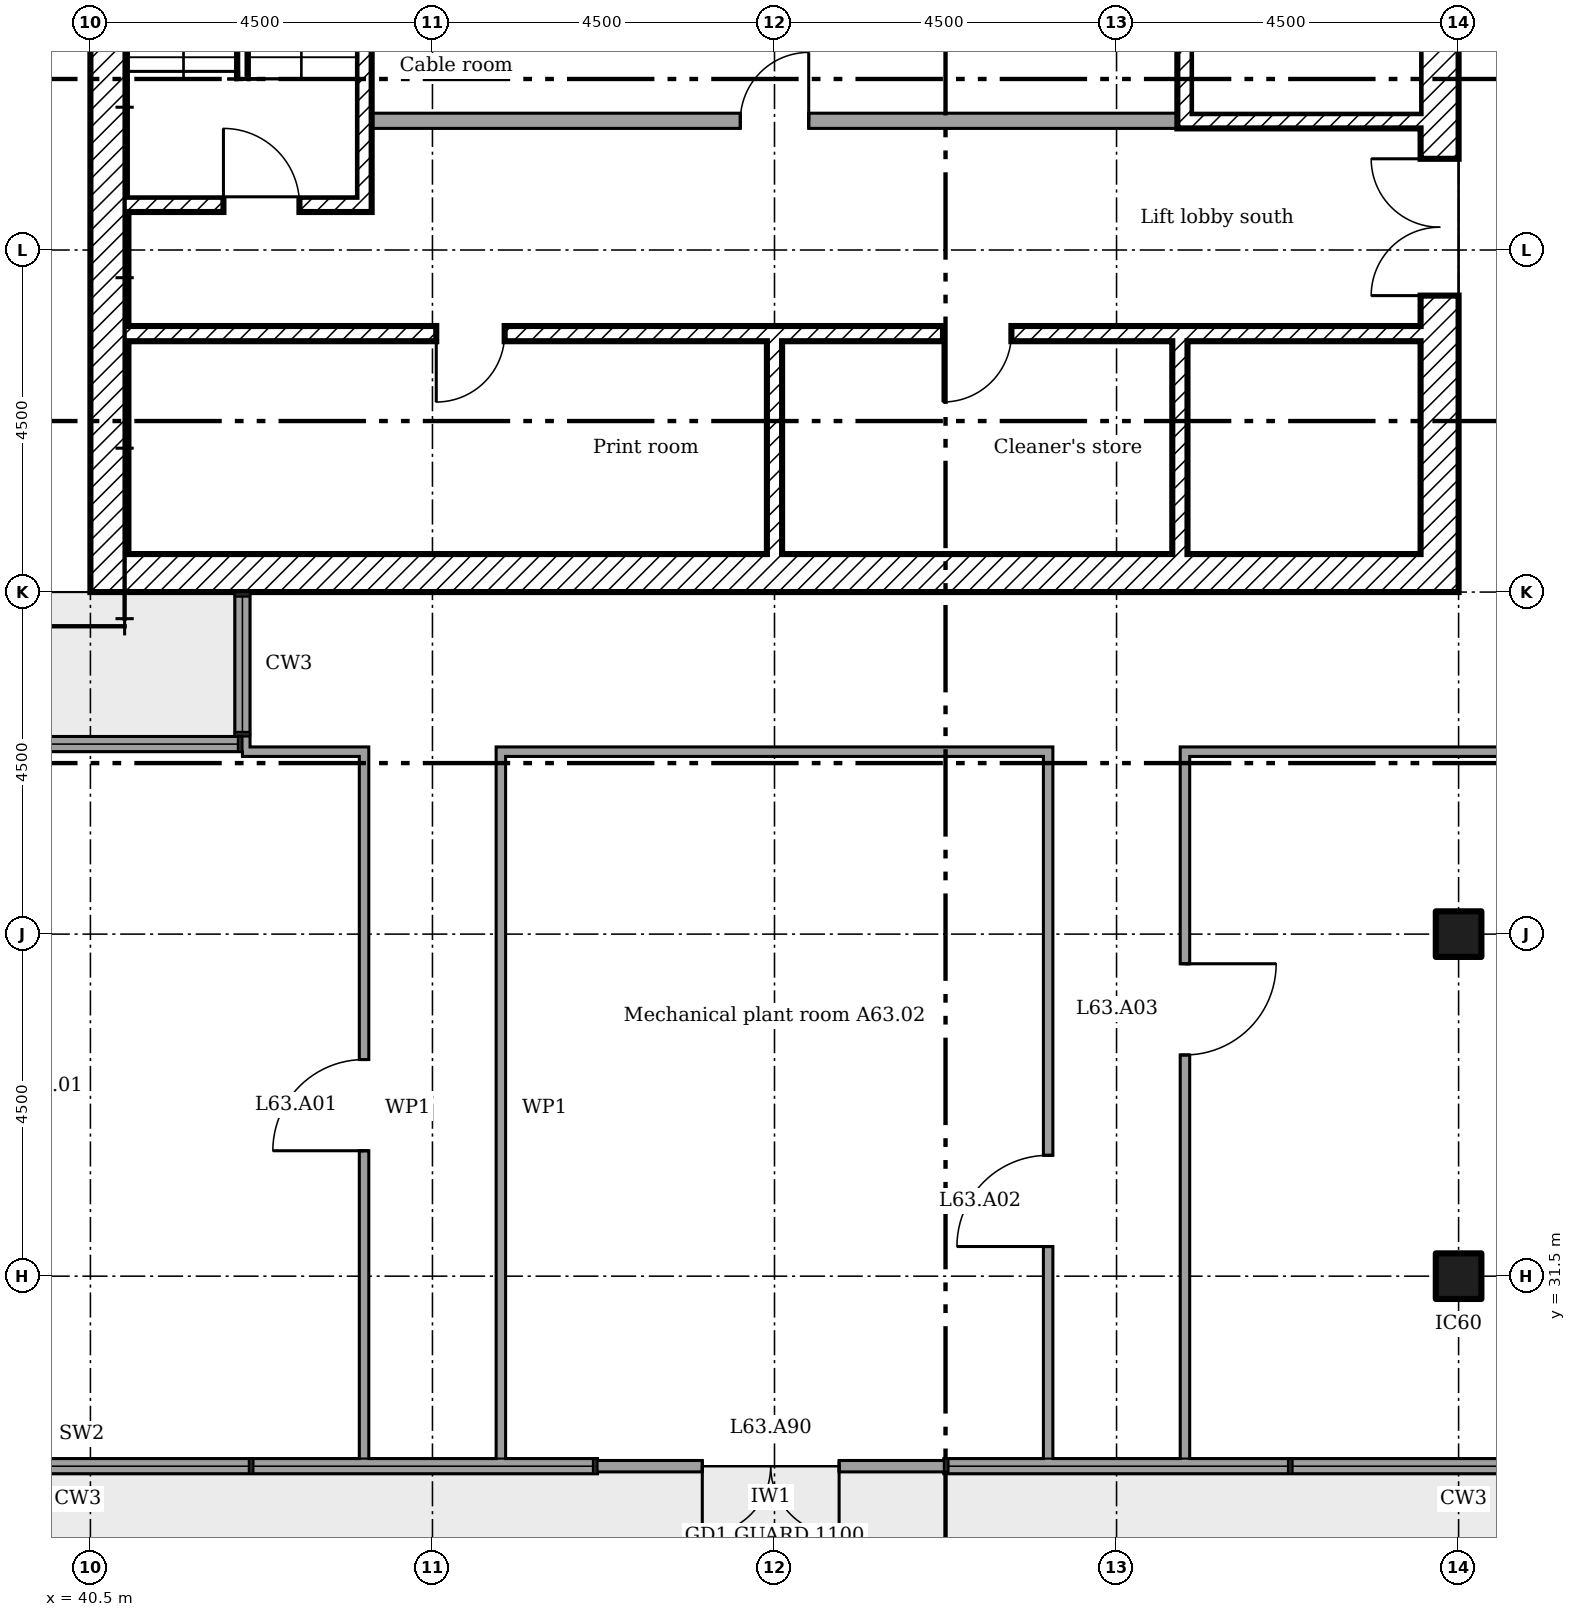
"""IFC4 building model, lengths in metres.
Left out: names, types, materials, properties, quantities, classifications, styles, units other than length and angle.
Written with IfcOpenShell. Run it as: python <this file> out.ifc"""

import sys

from ifc_helpers import new_model, si_unit, direction, frame, frame_2d, origin, origin_2d, place, context, subcontext, project, spatial, rectangle, extrude, element, fill, save


model = new_model("IFC4")
c1 = context("Model", 3, precision=1e-05, world=origin(), true_north=direction((0.0, 1.0)))
c2 = subcontext(c1, "Body", "Model", "MODEL_VIEW")
j1 = project(units=[si_unit("LENGTHUNIT", "METRE"), si_unit("PLANEANGLEUNIT", "RADIAN")], contexts=[c1])
p1 = place(None, origin())
s1 = spatial("IfcSite", under=j1, at=p1, CompositionType="ELEMENT")
p2 = place(p1, origin())
s2 = spatial("IfcBuilding", under=s1, at=p2, CompositionType="ELEMENT")
p3 = place(p2, frame((0.0, 0.0, 246.0)))
s3 = spatial("IfcBuildingStorey", under=s2, at=p3, CompositionType="ELEMENT", Elevation=246.0)
for number, where in (
    (1, (58.5, 31.5, 0.0)),
    (2, (58.5, 36.0, 0.0)),
):
    element("IfcColumn", number, at=place(p3, frame(where)), inside=s3, PredefinedType="COLUMN", context=c2, shape_type="SweptSolid", body=[
        extrude(rectangle(XDim=0.6, YDim=0.6, at=origin_2d()), origin(), (0.0, 0.0, 1.0), 5.0),
    ])
p4 = place(p3, frame((42.5, 40.5, 0.0), z_axis=(0.0, 0.0, 1.0), x_axis=(0.0, -1.0, 0.0)))
e3 = element("IfcWall", 3, at=p4, inside=s3, PredefinedType="ELEMENTEDWALL", context=c2, shape_type="SweptSolid", body=[
    extrude(rectangle(XDim=2.1, YDim=0.2, at=frame_2d((1.05, 0.0))), origin(), (0.0, 0.0, 1.0), 1.8),
])
p5 = place(p3, frame((42.4, 38.5, 0.0), z_axis=(0.0, 0.0, 1.0), x_axis=(-1.0, 0.0, 0.0)))
e4 = element("IfcWall", 4, at=p5, inside=s3, PredefinedType="ELEMENTEDWALL", context=c2, shape_type="SweptSolid", body=[
    extrude(rectangle(XDim=13.5, YDim=0.2, at=frame_2d((6.75, 0.0))), origin(), (0.0, 0.0, 1.0), 1.8),
])
p6 = place(p3, frame((33.6, 29.0, 0.0)))
e5 = element("IfcWall", 5, at=p6, inside=s3, PredefinedType="ELEMENTEDWALL", context=c2, shape_type="SweptSolid", body=[
    extrude(rectangle(XDim=13.571, YDim=0.2, at=frame_2d((6.786, 0.0))), origin(), (0.0, 0.0, 1.0), 1.8),
])
p7 = place(p3, frame((51.729, 29.0, 0.0)))
e6 = element("IfcWall", 6, at=p7, inside=s3, PredefinedType="ELEMENTEDWALL", context=c2, shape_type="SweptSolid", body=[
    extrude(rectangle(XDim=13.872, YDim=0.2, at=frame_2d((6.936, 0.0))), origin(), (0.0, 0.0, 1.0), 1.8),
])
p8 = place(p3, frame((47.171, 29.0, 0.0)))
e7 = element("IfcWall", 7, at=p8, inside=s3, PredefinedType="SOLIDWALL", context=c2, shape_type="SweptSolid", body=[
    extrude(rectangle(XDim=4.557, YDim=0.15, at=frame_2d((2.279, 0.0))), origin(), (0.0, 0.0, 1.0), 4.825),
])
p9 = place(p8, frame((1.379, 0.0, 0.0)))
e8 = element("IfcOpeningElement", 8, at=p9, cuts=e7, PredefinedType="OPENING", context=c2, shape_type="SweptSolid", body=[
    extrude(rectangle(XDim=1.8, YDim=2.4, at=frame_2d((0.9, 1.2))), frame((0.0, 0.085, 0.0), z_axis=(0.0, -1.0, 0.0), x_axis=(1.0, 0.0, 0.0)), (0.0, 0.0, 1.0), 0.17),
])
p10 = place(p3, frame((58.25, 40.5, 0.0), z_axis=(0.0, 0.0, 1.0), x_axis=(0.0, 1.0, 0.0)))
e9 = element("IfcWall", 9, at=p10, inside=s3, PredefinedType="SHEAR", context=c2, shape_type="SweptSolid", body=[
    extrude(rectangle(XDim=18.0, YDim=0.5, at=frame_2d((9.0, 0.0))), origin(), (0.0, 0.0, 1.0), 4.75),
])
p11 = place(p10, frame((13.15, 0.0, 0.0)))
e10 = element("IfcOpeningElement", 10, at=p11, cuts=e9, PredefinedType="OPENING", context=c2, shape_type="SweptSolid", body=[
    extrude(rectangle(XDim=1.2, YDim=2.1, at=frame_2d((0.6, 1.05))), frame((0.0, 0.26, 0.0), z_axis=(0.0, -1.0, 0.0), x_axis=(1.0, 0.0, 0.0)), (0.0, 0.0, 1.0), 0.52),
])
p12 = place(p10, frame((3.9, 0.0, 0.0)))
e11 = element("IfcOpeningElement", 11, at=p12, cuts=e9, PredefinedType="OPENING", context=c2, shape_type="SweptSolid", body=[
    extrude(rectangle(XDim=1.8, YDim=2.1, at=frame_2d((0.9, 1.05))), frame((0.0, 0.26, 0.0), z_axis=(0.0, -1.0, 0.0), x_axis=(1.0, 0.0, 0.0)), (0.0, 0.0, 1.0), 0.52),
])
p13 = place(p10, frame((11.525, 0.0, 0.0)))
e12 = element("IfcOpeningElement", 12, at=p13, cuts=e9, PredefinedType="OPENING", context=c2, shape_type="SweptSolid", body=[
    extrude(rectangle(XDim=1.0, YDim=2.1, at=frame_2d((0.5, 1.05))), frame((0.0, 0.26, 0.0), z_axis=(0.0, -1.0, 0.0), x_axis=(1.0, 0.0, 0.0)), (0.0, 0.0, 1.0), 0.52),
])
p14 = place(p3, frame((40.5, 40.75, 0.0)))
e13 = element("IfcWall", 13, at=p14, inside=s3, PredefinedType="SHEAR", context=c2, shape_type="SweptSolid", body=[
    extrude(rectangle(XDim=17.5, YDim=0.5, at=frame_2d((8.75, 0.0))), origin(), (0.0, 0.0, 1.0), 4.75),
])
p15 = place(p3, frame((40.75, 41.0, 0.0), z_axis=(0.0, 0.0, 1.0), x_axis=(0.0, 1.0, 0.0)))
e14 = element("IfcWall", 14, at=p15, inside=s3, PredefinedType="SHEAR", context=c2, shape_type="SweptSolid", body=[
    extrude(rectangle(XDim=17.0, YDim=0.5, at=frame_2d((8.5, 0.0))), origin(), (0.0, 0.0, 1.0), 4.75),
])
for number, where, z_axis, x_axis in (
    (15, (49.5, 41.0, 0.0), (0.0, 0.0, 1.0), (0.0, 1.0, 0.0)),
    (16, (54.833, 41.0, 0.0), (0.0, 0.0, 1.0), (0.0, 1.0, 0.0)),
):
    element("IfcWall", number, at=place(p3, frame(where, z_axis=z_axis, x_axis=x_axis)), inside=s3, PredefinedType="SHEAR", context=c2, shape_type="SweptSolid", body=[
        extrude(rectangle(XDim=2.8, YDim=0.2, at=frame_2d((1.4, 0.0))), origin(), (0.0, 0.0, 1.0), 4.75),
    ])
p16 = place(p3, frame((41.0, 43.9, 0.0)))
e17 = element("IfcWall", 17, at=p16, inside=s3, PredefinedType="SHEAR", context=c2, shape_type="SweptSolid", body=[
    extrude(rectangle(XDim=17.0, YDim=0.2, at=frame_2d((8.5, 0.0))), origin(), (0.0, 0.0, 1.0), 4.75),
])
p17 = place(p16, frame((4.05, 0.0, 0.0)))
e18 = element("IfcOpeningElement", 18, at=p17, cuts=e17, PredefinedType="OPENING", context=c2, shape_type="SweptSolid", body=[
    extrude(rectangle(XDim=0.9, YDim=2.1, at=frame_2d((0.45, 1.05))), frame((0.0, 0.11, 0.0), z_axis=(0.0, -1.0, 0.0), x_axis=(1.0, 0.0, 0.0)), (0.0, 0.0, 1.0), 0.22),
])
p18 = place(p16, frame((10.717, 0.0, 0.0)))
e19 = element("IfcOpeningElement", 19, at=p18, cuts=e17, PredefinedType="OPENING", context=c2, shape_type="SweptSolid", body=[
    extrude(rectangle(XDim=0.9, YDim=2.1, at=frame_2d((0.45, 1.05))), frame((0.0, 0.11, 0.0), z_axis=(0.0, -1.0, 0.0), x_axis=(1.0, 0.0, 0.0)), (0.0, 0.0, 1.0), 0.22),
])
p19 = place(p3, frame((44.1, 45.5, 0.0), z_axis=(0.0, 0.0, 1.0), x_axis=(0.0, 1.0, 0.0)))
e20 = element("IfcWall", 20, at=p19, inside=s3, PredefinedType="SHEAR", context=c2, shape_type="SweptSolid", body=[
    extrude(rectangle(XDim=6.9, YDim=0.2, at=frame_2d((3.45, 0.0))), origin(), (0.0, 0.0, 1.0), 4.75),
])
p20 = place(p3, frame((41.0, 45.6, 0.0)))
e21 = element("IfcWall", 21, at=p20, inside=s3, PredefinedType="SHEAR", context=c2, shape_type="SweptSolid", body=[
    extrude(rectangle(XDim=3.0, YDim=0.2, at=frame_2d((1.5, 0.0))), origin(), (0.0, 0.0, 1.0), 4.75),
])
p21 = place(p20, frame((1.25, 0.0, 0.0)))
e22 = element("IfcOpeningElement", 22, at=p21, cuts=e21, PredefinedType="OPENING", context=c2, shape_type="SweptSolid", body=[
    extrude(rectangle(XDim=1.0, YDim=2.1, at=frame_2d((0.5, 1.05))), frame((0.0, 0.11, 0.0), z_axis=(0.0, -1.0, 0.0), x_axis=(1.0, 0.0, 0.0)), (0.0, 0.0, 1.0), 0.22),
])
p22 = place(p3, frame((54.8, 46.7, 0.0)))
e23 = element("IfcWall", 23, at=p22, inside=s3, PredefinedType="SHEAR", context=c2, shape_type="SweptSolid", body=[
    extrude(rectangle(XDim=3.2, YDim=0.2, at=frame_2d((1.6, 0.0))), origin(), (0.0, 0.0, 1.0), 4.75),
])
p23 = place(p3, frame((54.9, 46.8, 0.0), z_axis=(0.0, 0.0, 1.0), x_axis=(0.0, 1.0, 0.0)))
e24 = element("IfcWall", 24, at=p23, inside=s3, PredefinedType="SHEAR", context=c2, shape_type="SweptSolid", body=[
    extrude(rectangle(XDim=6.5, YDim=0.2, at=frame_2d((3.25, 0.0))), origin(), (0.0, 0.0, 1.0), 4.75),
])
p24 = place(p3, frame((44.2, 46.7, 0.0)))
e25 = element("IfcWall", 25, at=p24, inside=s3, PredefinedType="PARTITIONING", context=c2, shape_type="SweptSolid", body=[
    extrude(rectangle(XDim=10.6, YDim=0.2, at=frame_2d((5.3, 0.0))), origin(), (0.0, 0.0, 1.0), 4.75),
])
p25 = place(p24, frame((4.85, 0.0, 0.0)))
e26 = element("IfcOpeningElement", 26, at=p25, cuts=e25, PredefinedType="OPENING", context=c2, shape_type="SweptSolid", body=[
    extrude(rectangle(XDim=0.9, YDim=2.1, at=frame_2d((0.45, 1.05))), frame((0.0, 0.11, 0.0), z_axis=(0.0, -1.0, 0.0), x_axis=(1.0, 0.0, 0.0)), (0.0, 0.0, 1.0), 0.22),
])
p26 = place(p3, frame((42.5, 38.4, 0.0)))
e27 = element("IfcWall", 27, at=p26, inside=s3, PredefinedType="PARTITIONING", context=c2, shape_type="SweptSolid", body=[
    extrude(rectangle(XDim=1.663, YDim=0.125, at=frame_2d((0.831, 0.0))), origin(), (0.0, 0.0, 1.0), 4.825),
])
p27 = place(p3, frame((45.837, 38.4, 0.0)))
e28 = element("IfcWall", 28, at=p27, inside=s3, PredefinedType="PARTITIONING", context=c2, shape_type="SweptSolid", body=[
    extrude(rectangle(XDim=7.325, YDim=0.125, at=frame_2d((3.663, 0.0))), origin(), (0.0, 0.0, 1.0), 4.825),
])
p28 = place(p3, frame((54.837, 38.4, 0.0)))
e29 = element("IfcWall", 29, at=p28, inside=s3, PredefinedType="PARTITIONING", context=c2, shape_type="SweptSolid", body=[
    extrude(rectangle(XDim=5.825, YDim=0.125, at=frame_2d((2.913, 0.0))), origin(), (0.0, 0.0, 1.0), 4.825),
])
p29 = place(p3, frame((44.1, 29.1, 0.0), z_axis=(0.0, 0.0, 1.0), x_axis=(0.0, 1.0, 0.0)))
e30 = element("IfcWall", 30, at=p29, inside=s3, PredefinedType="PARTITIONING", context=c2, shape_type="SweptSolid", body=[
    extrude(rectangle(XDim=9.237, YDim=0.125, at=frame_2d((4.619, 0.0))), origin(), (0.0, 0.0, 1.0), 4.825),
])
p30 = place(p29, frame((4.05, 0.0, 0.0)))
e31 = element("IfcOpeningElement", 31, at=p30, cuts=e30, PredefinedType="OPENING", context=c2, shape_type="SweptSolid", body=[
    extrude(rectangle(XDim=1.2, YDim=2.1, at=frame_2d((0.6, 1.05))), frame((0.0, 0.073, 0.0), z_axis=(0.0, -1.0, 0.0), x_axis=(1.0, 0.0, 0.0)), (0.0, 0.0, 1.0), 0.145),
])
p31 = place(p3, frame((45.9, 29.1, 0.0), z_axis=(0.0, 0.0, 1.0), x_axis=(0.0, 1.0, 0.0)))
e32 = element("IfcWall", 32, at=p31, inside=s3, PredefinedType="PARTITIONING", context=c2, shape_type="SweptSolid", body=[
    extrude(rectangle(XDim=9.237, YDim=0.125, at=frame_2d((4.619, 0.0))), origin(), (0.0, 0.0, 1.0), 4.825),
])
p32 = place(p3, frame((53.1, 29.1, 0.0), z_axis=(0.0, 0.0, 1.0), x_axis=(0.0, 1.0, 0.0)))
e33 = element("IfcWall", 33, at=p32, inside=s3, PredefinedType="PARTITIONING", context=c2, shape_type="SweptSolid", body=[
    extrude(rectangle(XDim=9.237, YDim=0.125, at=frame_2d((4.619, 0.0))), origin(), (0.0, 0.0, 1.0), 4.825),
])
p33 = place(p32, frame((2.79, 0.0, 0.0)))
e34 = element("IfcOpeningElement", 34, at=p33, cuts=e33, PredefinedType="OPENING", context=c2, shape_type="SweptSolid", body=[
    extrude(rectangle(XDim=1.2, YDim=2.1, at=frame_2d((0.6, 1.05))), frame((0.0, 0.073, 0.0), z_axis=(0.0, -1.0, 0.0), x_axis=(1.0, 0.0, 0.0)), (0.0, 0.0, 1.0), 0.145),
])
p34 = place(p3, frame((54.9, 29.1, 0.0), z_axis=(0.0, 0.0, 1.0), x_axis=(0.0, 1.0, 0.0)))
e35 = element("IfcWall", 35, at=p34, inside=s3, PredefinedType="PARTITIONING", context=c2, shape_type="SweptSolid", body=[
    extrude(rectangle(XDim=9.237, YDim=0.125, at=frame_2d((4.619, 0.0))), origin(), (0.0, 0.0, 1.0), 4.825),
])
p35 = place(p34, frame((5.31, 0.0, 0.0)))
e36 = element("IfcOpeningElement", 36, at=p35, cuts=e35, PredefinedType="OPENING", context=c2, shape_type="SweptSolid", body=[
    extrude(rectangle(XDim=1.2, YDim=2.1, at=frame_2d((0.6, 1.05))), frame((0.0, 0.073, 0.0), z_axis=(0.0, -1.0, 0.0), x_axis=(1.0, 0.0, 0.0)), (0.0, 0.0, 1.0), 0.145),
])
p36 = place(p9, frame((1.8, 0.0, 0.0), x_axis=(-1.0, 0.0, 0.0)))
e37 = element("IfcDoor", 37, at=p36, inside=s3, OperationType="DOUBLE_DOOR_DOUBLE_SWING", PredefinedType="NOTDEFINED", context=c2, shape_type="SweptSolid", body=[
    extrude(rectangle(XDim=1.8, YDim=2.4, at=frame_2d((0.9, 1.2))), frame((0.0, 0.025, 0.0), z_axis=(0.0, -1.0, 0.0), x_axis=(1.0, 0.0, 0.0)), (0.0, 0.0, 1.0), 0.05),
])
fill(e8, e37)
p37 = place(p12, origin())
e38 = element("IfcDoor", 38, at=p37, inside=s3, OperationType="DOUBLE_DOOR_SINGLE_SWING", PredefinedType="DOOR", context=c2, shape_type="SweptSolid", body=[
    extrude(rectangle(XDim=1.8, YDim=2.1, at=frame_2d((0.9, 1.05))), frame((0.0, 0.025, 0.0), z_axis=(0.0, -1.0, 0.0), x_axis=(1.0, 0.0, 0.0)), (0.0, 0.0, 1.0), 0.05),
])
fill(e11, e38)
p38 = place(p21, origin())
e39 = element("IfcDoor", 39, at=p38, inside=s3, OperationType="SINGLE_SWING_RIGHT", PredefinedType="DOOR", context=c2, shape_type="SweptSolid", body=[
    extrude(rectangle(XDim=1.0, YDim=2.1, at=frame_2d((0.5, 1.05))), frame((0.0, 0.025, 0.0), z_axis=(0.0, -1.0, 0.0), x_axis=(1.0, 0.0, 0.0)), (0.0, 0.0, 1.0), 0.05),
])
fill(e22, e39)
p39 = place(p17, frame((0.9, 0.0, 0.0), x_axis=(-1.0, 0.0, 0.0)))
e40 = element("IfcDoor", 40, at=p39, inside=s3, OperationType="SINGLE_SWING_LEFT", PredefinedType="DOOR", context=c2, shape_type="SweptSolid", body=[
    extrude(rectangle(XDim=0.9, YDim=2.1, at=frame_2d((0.45, 1.05))), frame((0.0, 0.025, 0.0), z_axis=(0.0, -1.0, 0.0), x_axis=(1.0, 0.0, 0.0)), (0.0, 0.0, 1.0), 0.05),
])
fill(e18, e40)
p40 = place(p18, frame((0.9, 0.0, 0.0), x_axis=(-1.0, 0.0, 0.0)))
e41 = element("IfcDoor", 41, at=p40, inside=s3, OperationType="SINGLE_SWING_LEFT", PredefinedType="DOOR", context=c2, shape_type="SweptSolid", body=[
    extrude(rectangle(XDim=0.9, YDim=2.1, at=frame_2d((0.45, 1.05))), frame((0.0, 0.025, 0.0), z_axis=(0.0, -1.0, 0.0), x_axis=(1.0, 0.0, 0.0)), (0.0, 0.0, 1.0), 0.05),
])
fill(e19, e41)
p41 = place(p25, origin())
e42 = element("IfcDoor", 42, at=p41, inside=s3, OperationType="SINGLE_SWING_LEFT", PredefinedType="DOOR", context=c2, shape_type="SweptSolid", body=[
    extrude(rectangle(XDim=0.9, YDim=2.1, at=frame_2d((0.45, 1.05))), frame((0.0, 0.025, 0.0), z_axis=(0.0, -1.0, 0.0), x_axis=(1.0, 0.0, 0.0)), (0.0, 0.0, 1.0), 0.05),
])
fill(e26, e42)
p42 = place(p30, origin())
e43 = element("IfcDoor", 43, at=p42, inside=s3, OperationType="SINGLE_SWING_RIGHT", PredefinedType="DOOR", context=c2, shape_type="SweptSolid", body=[
    extrude(rectangle(XDim=1.2, YDim=2.1, at=frame_2d((0.6, 1.05))), frame((0.0, 0.025, 0.0), z_axis=(0.0, -1.0, 0.0), x_axis=(1.0, 0.0, 0.0)), (0.0, 0.0, 1.0), 0.05),
])
fill(e31, e43)
p43 = place(p33, origin())
e44 = element("IfcDoor", 44, at=p43, inside=s3, OperationType="SINGLE_SWING_RIGHT", PredefinedType="DOOR", context=c2, shape_type="SweptSolid", body=[
    extrude(rectangle(XDim=1.2, YDim=2.1, at=frame_2d((0.6, 1.05))), frame((0.0, 0.025, 0.0), z_axis=(0.0, -1.0, 0.0), x_axis=(1.0, 0.0, 0.0)), (0.0, 0.0, 1.0), 0.05),
])
fill(e34, e44)
p44 = place(p35, frame((1.2, 0.0, 0.0), x_axis=(-1.0, 0.0, 0.0)))
e45 = element("IfcDoor", 45, at=p44, inside=s3, OperationType="SINGLE_SWING_RIGHT", PredefinedType="DOOR", context=c2, shape_type="SweptSolid", body=[
    extrude(rectangle(XDim=1.2, YDim=2.1, at=frame_2d((0.6, 1.05))), frame((0.0, 0.025, 0.0), z_axis=(0.0, -1.0, 0.0), x_axis=(1.0, 0.0, 0.0)), (0.0, 0.0, 1.0), 0.05),
])
fill(e36, e45)
save(model, sys.argv[1])
